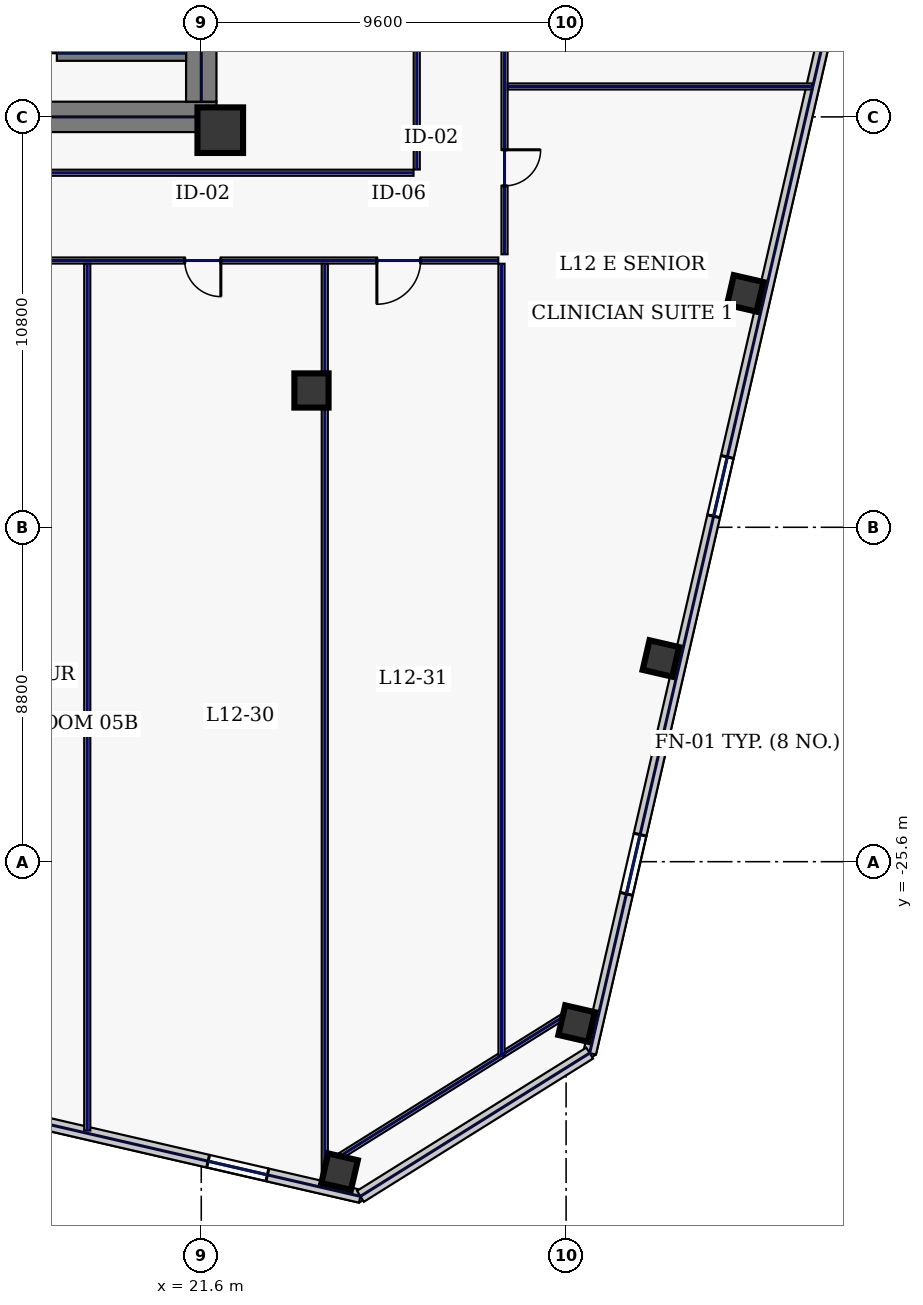
"""IFC4 building model, lengths in metres.
Left out: names, types, materials, properties, quantities, classifications, styles, units other than length and angle.
Written with IfcOpenShell. Run it as: python <this file> out.ifc"""

import sys

from ifc_helpers import new_model, si_unit, direction, frame, frame_2d, origin, origin_2d, place, context, subcontext, project, spatial, rectangle, hollow_rectangle, extrude, element, fill, save


model = new_model("IFC4")
c1 = context("Model", 3, precision=1e-05, world=origin(), true_north=direction((0.0, 1.0)))
c2 = subcontext(c1, "Body", "Model", "MODEL_VIEW")
j1 = project(units=[si_unit("LENGTHUNIT", "METRE"), si_unit("PLANEANGLEUNIT", "RADIAN")], contexts=[c1])
p1 = place(None, origin())
s1 = spatial("IfcSite", under=j1, at=p1, CompositionType="ELEMENT")
p2 = place(p1, origin())
s2 = spatial("IfcBuilding", under=s1, at=p2, CompositionType="ELEMENT")
p3 = place(p2, frame((0.0, 0.0, 59.4)))
s3 = spatial("IfcBuildingStorey", under=s2, at=p3, CompositionType="ELEMENT", Elevation=59.4)
p4 = place(p3, frame((10.4, -6.0, 0.0), z_axis=(0.0, 0.0, 1.0), x_axis=(1.0, 0.0, 0.0)))
e1 = element("IfcWall", 1, at=p4, inside=s3, PredefinedType="SHEAR", context=c2, shape_type="SweptSolid", body=[
    extrude(rectangle(XDim=11.6, YDim=0.8, at=frame_2d((5.8, 0.0))), origin(), (0.0, 0.0, 1.0), 3.74),
])
p5 = place(p3, frame((21.6, -5.6, 0.0), z_axis=(0.0, 0.0, 1.0), x_axis=(0.0, 1.0, 0.0)))
e2 = element("IfcWall", 2, at=p5, inside=s3, PredefinedType="SHEAR", context=c2, shape_type="SweptSolid", body=[
    extrude(rectangle(XDim=11.2, YDim=0.8, at=frame_2d((5.6, 0.0))), origin(), (0.0, 0.0, 1.0), 3.74),
])
p6 = place(p3, frame((17.6, -4.325, 0.0), z_axis=(0.0, 0.0, 1.0), x_axis=(0.0, 1.0, 0.0)))
e3 = element("IfcWall", 3, at=p6, inside=s3, PredefinedType="SHEAR", context=c2, shape_type="SweptSolid", body=[
    extrude(rectangle(XDim=8.65, YDim=0.4, at=frame_2d((4.325, 0.0))), origin(), (0.0, 0.0, 1.0), 3.74),
])
p7 = place(p6, frame((0.25, 0.0, 0.0)))
e4 = element("IfcOpeningElement", 4, at=p7, cuts=e3, PredefinedType="OPENING", context=c2, shape_type="SweptSolid", body=[
    extrude(rectangle(XDim=1.1, YDim=2.2, at=frame_2d((0.55, 1.1))), frame((0.0, 0.21, 0.0), z_axis=(0.0, -1.0, 0.0), x_axis=(1.0, 0.0, 0.0)), (0.0, 0.0, 1.0), 0.42),
])
p8 = place(p3, frame((17.8, -4.325, 0.0), z_axis=(0.0, 0.0, 1.0), x_axis=(1.0, 0.0, 0.0)))
e5 = element("IfcWall", 5, at=p8, inside=s3, PredefinedType="SHEAR", context=c2, shape_type="SweptSolid", body=[
    extrude(rectangle(XDim=3.4, YDim=0.4, at=frame_2d((1.7, 0.0))), origin(), (0.0, 0.0, 1.0), 3.74),
])
p9 = place(p3, frame((22.1, -6.35, 0.0), z_axis=(0.0, 0.0, 1.0), x_axis=(1.0, 0.0, 0.0)))
e6 = element("IfcColumn", 6, at=p9, inside=s3, PredefinedType="COLUMN", context=c2, shape_type="SweptSolid", body=[
    extrude(hollow_rectangle(XDim=1.2, YDim=1.2, WallThickness=0.05, at=origin_2d()), origin(), (0.0, 0.0, 1.0), 3.74),
])
p10 = place(p3, frame((24.5, -13.2, 0.0), z_axis=(0.0, 0.0, 1.0), x_axis=(1.0, 0.0, 0.0)))
e7 = element("IfcColumn", 7, at=p10, inside=s3, PredefinedType="COLUMN", context=c2, shape_type="SweptSolid", body=[
    extrude(hollow_rectangle(XDim=0.9, YDim=0.9, WallThickness=0.04, at=origin_2d()), origin(), (0.0, 0.0, 1.0), 3.74),
])
for number, where, z_axis, x_axis in (
    (8, (25.24, -33.757, 0.0), (0.0, 0.0, 1.0), (0.974, -0.225, 0.0)),
    (9, (31.476, -29.86, 0.0), (0.0, 0.0, 1.0), (0.974, -0.225, 0.0)),
    (10, (33.694, -20.252, 0.0), (0.0, 0.0, 1.0), (0.974, -0.225, 0.0)),
    (11, (35.912, -10.645, 0.0), (0.0, 0.0, 1.0), (0.974, -0.225, 0.0)),
):
    element("IfcColumn", number, at=place(p3, frame(where, z_axis=z_axis, x_axis=x_axis)), inside=s3, PredefinedType="COLUMN", context=c2, shape_type="SweptSolid", body=[
        extrude(hollow_rectangle(XDim=0.8, YDim=0.8, WallThickness=0.036, at=origin_2d()), origin(), (0.0, 0.0, 1.0), 3.74),
    ])
p11 = place(p3, frame((3.717, -29.311, 0.0), z_axis=(0.0, 0.0, 1.0), x_axis=(0.97436993772, -0.224951604723, 0.0)))
e12 = element("IfcWall", 12, at=p11, inside=s3, PredefinedType="STANDARD", context=c2, shape_type="SweptSolid", body=[
    extrude(rectangle(XDim=22.651, YDim=0.34, at=frame_2d((11.326, 0.0))), origin(), (0.0, 0.0, 1.0), 3.74),
])
p12 = place(p11, frame((4.306, 0.0, 0.22)))
e13 = element("IfcOpeningElement", 13, at=p12, cuts=e12, PredefinedType="OPENING", context=c2, shape_type="SweptSolid", body=[
    extrude(rectangle(XDim=1.6, YDim=1.2, at=frame_2d((0.8, 0.6))), frame((0.0, 0.18, 0.0), z_axis=(0.0, -1.0, 0.0), x_axis=(1.0, 0.0, 0.0)), (0.0, 0.0, 1.0), 0.36),
])
p13 = place(p11, frame((18.539, 0.0, 0.22)))
e14 = element("IfcOpeningElement", 14, at=p13, cuts=e12, PredefinedType="OPENING", context=c2, shape_type="SweptSolid", body=[
    extrude(rectangle(XDim=1.6, YDim=1.2, at=frame_2d((0.8, 0.6))), frame((0.0, 0.18, 0.0), z_axis=(0.0, -1.0, 0.0), x_axis=(1.0, 0.0, 0.0)), (0.0, 0.0, 1.0), 0.36),
])
p14 = place(p3, frame((31.82, -30.637, 0.0), z_axis=(0.0, 0.0, 1.0), x_axis=(0.224949969076, 0.974370315338, 0.0)))
e15 = element("IfcWall", 15, at=p14, inside=s3, PredefinedType="STANDARD", context=c2, shape_type="SweptSolid", body=[
    extrude(rectangle(XDim=40.8, YDim=0.34, at=frame_2d((20.4, 0.0))), origin(), (0.0, 0.0, 1.0), 3.74),
])
p15 = place(p14, frame((4.3, 0.0, 0.22)))
e16 = element("IfcOpeningElement", 16, at=p15, cuts=e15, PredefinedType="OPENING", context=c2, shape_type="SweptSolid", body=[
    extrude(rectangle(XDim=1.6, YDim=1.2, at=frame_2d((0.8, 0.6))), frame((0.0, 0.18, 0.0), z_axis=(0.0, -1.0, 0.0), x_axis=(1.0, 0.0, 0.0)), (0.0, 0.0, 1.0), 0.36),
])
p16 = place(p14, frame((14.5, 0.0, 0.22)))
e17 = element("IfcOpeningElement", 17, at=p16, cuts=e15, PredefinedType="OPENING", context=c2, shape_type="SweptSolid", body=[
    extrude(rectangle(XDim=1.6, YDim=1.2, at=frame_2d((0.8, 0.6))), frame((0.0, 0.18, 0.0), z_axis=(0.0, -1.0, 0.0), x_axis=(1.0, 0.0, 0.0)), (0.0, 0.0, 1.0), 0.36),
])
p17 = place(p3, frame((25.788, -34.406, 0.0), z_axis=(0.0, 0.0, 1.0), x_axis=(0.848046504656, 0.529921811158, 0.0)))
e18 = element("IfcWall", 18, at=p17, inside=s3, PredefinedType="STANDARD", context=c2, shape_type="SweptSolid", body=[
    extrude(rectangle(XDim=7.113, YDim=0.34, at=frame_2d((3.557, 0.0))), origin(), (0.0, 0.0, 1.0), 3.74),
])
p18 = place(p3, frame((25.06, -33.468, 0.0), z_axis=(0.0, 0.0, 1.0), x_axis=(0.848043064089, 0.529927317139, 0.0)))
e19 = element("IfcWall", 19, at=p18, inside=s3, PredefinedType="PARTITIONING", context=c2, shape_type="SweptSolid", body=[
    extrude(rectangle(XDim=7.354, YDim=0.16, at=frame_2d((3.677, 0.0))), origin(), (0.0, 0.0, 1.0), 1.535),
])
p19 = place(p3, frame((29.58, 9.665, 0.0), z_axis=(0.0, 0.0, 1.0), x_axis=(0.0, -1.0, 0.0)))
e20 = element("IfcWall", 20, at=p19, inside=s3, PredefinedType="PARTITIONING", context=c2, shape_type="SweptSolid", body=[
    extrude(rectangle(XDim=19.28, YDim=0.16, at=frame_2d((9.64, 0.0))), origin(), (0.0, 0.0, 1.0), 3.74),
])
p20 = place(p19, frame((16.531, 0.0, 0.0)))
e21 = element("IfcOpeningElement", 21, at=p20, cuts=e20, PredefinedType="OPENING", context=c2, shape_type="SweptSolid", body=[
    extrude(rectangle(XDim=0.95, YDim=2.2, at=frame_2d((0.475, 1.1))), frame((0.0, 0.09, 0.0), z_axis=(0.0, -1.0, 0.0), x_axis=(1.0, 0.0, 0.0)), (0.0, 0.0, 1.0), 0.18),
])
p21 = place(p19, frame((11.875, 0.0, 0.0)))
e22 = element("IfcOpeningElement", 22, at=p21, cuts=e20, PredefinedType="OPENING", context=c2, shape_type="SweptSolid", body=[
    extrude(rectangle(XDim=0.95, YDim=2.2, at=frame_2d((0.475, 1.1))), frame((0.0, 0.09, 0.0), z_axis=(0.0, -1.0, 0.0), x_axis=(1.0, 0.0, 0.0)), (0.0, 0.0, 1.0), 0.18),
])
p22 = place(p19, frame((6.675, 0.0, 0.0)))
e23 = element("IfcOpeningElement", 23, at=p22, cuts=e20, PredefinedType="OPENING", context=c2, shape_type="SweptSolid", body=[
    extrude(rectangle(XDim=0.95, YDim=2.2, at=frame_2d((0.475, 1.1))), frame((0.0, 0.09, 0.0), z_axis=(0.0, -1.0, 0.0), x_axis=(1.0, 0.0, 0.0)), (0.0, 0.0, 1.0), 0.18),
])
p23 = place(p19, frame((1.994, 0.0, 0.0)))
e24 = element("IfcOpeningElement", 24, at=p23, cuts=e20, PredefinedType="OPENING", context=c2, shape_type="SweptSolid", body=[
    extrude(rectangle(XDim=0.95, YDim=2.2, at=frame_2d((0.475, 1.1))), frame((0.0, 0.09, 0.0), z_axis=(0.0, -1.0, 0.0), x_axis=(1.0, 0.0, 0.0)), (0.0, 0.0, 1.0), 0.18),
])
p24 = place(p3, frame((29.415, -9.78, 0.0), z_axis=(0.0, 0.0, 1.0), x_axis=(-1.0, 0.0, 0.0)))
e25 = element("IfcWall", 25, at=p24, inside=s3, PredefinedType="PARTITIONING", context=c2, shape_type="SweptSolid", body=[
    extrude(rectangle(XDim=58.83, YDim=0.16, at=frame_2d((29.415, 0.0))), origin(), (0.0, 0.0, 1.0), 3.74),
])
p25 = place(p24, frame((56.006, 0.0, 0.0)))
e26 = element("IfcOpeningElement", 26, at=p25, cuts=e25, PredefinedType="OPENING", context=c2, shape_type="SweptSolid", body=[
    extrude(rectangle(XDim=0.95, YDim=2.2, at=frame_2d((0.475, 1.1))), frame((0.0, 0.09, 0.0), z_axis=(0.0, -1.0, 0.0), x_axis=(1.0, 0.0, 0.0)), (0.0, 0.0, 1.0), 0.18),
])
p26 = place(p24, frame((50.39, 0.0, 0.0)))
e27 = element("IfcOpeningElement", 27, at=p26, cuts=e25, PredefinedType="OPENING", context=c2, shape_type="SweptSolid", body=[
    extrude(rectangle(XDim=0.95, YDim=2.2, at=frame_2d((0.475, 1.1))), frame((0.0, 0.09, 0.0), z_axis=(0.0, -1.0, 0.0), x_axis=(1.0, 0.0, 0.0)), (0.0, 0.0, 1.0), 0.18),
])
p27 = place(p24, frame((43.87, 0.0, 0.0)))
e28 = element("IfcOpeningElement", 28, at=p27, cuts=e25, PredefinedType="OPENING", context=c2, shape_type="SweptSolid", body=[
    extrude(rectangle(XDim=1.05, YDim=2.2, at=frame_2d((0.525, 1.1))), frame((0.0, 0.09, 0.0), z_axis=(0.0, -1.0, 0.0), x_axis=(1.0, 0.0, 0.0)), (0.0, 0.0, 1.0), 0.18),
])
p28 = place(p24, frame((37.135, 0.0, 0.0)))
e29 = element("IfcOpeningElement", 29, at=p28, cuts=e25, PredefinedType="OPENING", context=c2, shape_type="SweptSolid", body=[
    extrude(rectangle(XDim=0.95, YDim=2.2, at=frame_2d((0.475, 1.1))), frame((0.0, 0.09, 0.0), z_axis=(0.0, -1.0, 0.0), x_axis=(1.0, 0.0, 0.0)), (0.0, 0.0, 1.0), 0.18),
])
p29 = place(p24, frame((30.907, 0.0, 0.0)))
e30 = element("IfcOpeningElement", 30, at=p29, cuts=e25, PredefinedType="OPENING", context=c2, shape_type="SweptSolid", body=[
    extrude(rectangle(XDim=0.95, YDim=2.2, at=frame_2d((0.475, 1.1))), frame((0.0, 0.09, 0.0), z_axis=(0.0, -1.0, 0.0), x_axis=(1.0, 0.0, 0.0)), (0.0, 0.0, 1.0), 0.18),
])
p30 = place(p24, frame((26.302, 0.0, 0.0)))
e31 = element("IfcOpeningElement", 31, at=p30, cuts=e25, PredefinedType="OPENING", context=c2, shape_type="SweptSolid", body=[
    extrude(rectangle(XDim=0.95, YDim=2.2, at=frame_2d((0.475, 1.1))), frame((0.0, 0.09, 0.0), z_axis=(0.0, -1.0, 0.0), x_axis=(1.0, 0.0, 0.0)), (0.0, 0.0, 1.0), 0.18),
])
p31 = place(p24, frame((20.55, 0.0, 0.0)))
e32 = element("IfcOpeningElement", 32, at=p31, cuts=e25, PredefinedType="OPENING", context=c2, shape_type="SweptSolid", body=[
    extrude(rectangle(XDim=0.95, YDim=2.2, at=frame_2d((0.475, 1.1))), frame((0.0, 0.09, 0.0), z_axis=(0.0, -1.0, 0.0), x_axis=(1.0, 0.0, 0.0)), (0.0, 0.0, 1.0), 0.18),
])
p32 = place(p24, frame((13.65, 0.0, 0.0)))
e33 = element("IfcOpeningElement", 33, at=p32, cuts=e25, PredefinedType="OPENING", context=c2, shape_type="SweptSolid", body=[
    extrude(rectangle(XDim=1.05, YDim=2.2, at=frame_2d((0.525, 1.1))), frame((0.0, 0.09, 0.0), z_axis=(0.0, -1.0, 0.0), x_axis=(1.0, 0.0, 0.0)), (0.0, 0.0, 1.0), 0.18),
])
p33 = place(p24, frame((7.3, 0.0, 0.0)))
e34 = element("IfcOpeningElement", 34, at=p33, cuts=e25, PredefinedType="OPENING", context=c2, shape_type="SweptSolid", body=[
    extrude(rectangle(XDim=0.95, YDim=2.2, at=frame_2d((0.475, 1.1))), frame((0.0, 0.09, 0.0), z_axis=(0.0, -1.0, 0.0), x_axis=(1.0, 0.0, 0.0)), (0.0, 0.0, 1.0), 0.18),
])
p34 = place(p24, frame((2.044, 0.0, 0.0)))
e35 = element("IfcOpeningElement", 35, at=p34, cuts=e25, PredefinedType="OPENING", context=c2, shape_type="SweptSolid", body=[
    extrude(rectangle(XDim=1.15, YDim=2.2, at=frame_2d((0.575, 1.1))), frame((0.0, 0.09, 0.0), z_axis=(0.0, -1.0, 0.0), x_axis=(1.0, 0.0, 0.0)), (0.0, 0.0, 1.0), 0.18),
])
p35 = place(p3, frame((10.665, -7.47, 0.0), z_axis=(0.0, 0.0, 1.0), x_axis=(1.0, 0.0, 0.0)))
e36 = element("IfcWall", 36, at=p35, inside=s3, PredefinedType="PARTITIONING", context=c2, shape_type="SweptSolid", body=[
    extrude(rectangle(XDim=16.52, YDim=0.16, at=frame_2d((8.26, 0.0))), origin(), (0.0, 0.0, 1.0), 3.74),
])
p36 = place(p3, frame((27.27, -7.385, 0.0), z_axis=(0.0, 0.0, 1.0), x_axis=(0.0, 1.0, 0.0)))
e37 = element("IfcWall", 37, at=p36, inside=s3, PredefinedType="PARTITIONING", context=c2, shape_type="SweptSolid", body=[
    extrude(rectangle(XDim=14.82, YDim=0.16, at=frame_2d((7.41, 0.0))), origin(), (0.0, 0.0, 1.0), 3.74),
])
p37 = place(p3, frame((29.5, -30.703, 0.0), z_axis=(0.0, 0.0, 1.0), x_axis=(0.0, 1.0, 0.0)))
e38 = element("IfcWall", 38, at=p37, inside=s3, PredefinedType="PARTITIONING", context=c2, shape_type="SweptSolid", body=[
    extrude(rectangle(XDim=20.838, YDim=0.16, at=frame_2d((10.419, 0.0))), origin(), (0.0, 0.0, 1.0), 3.74),
])
p38 = place(p3, frame((18.6, -32.675, 0.0), z_axis=(0.0, 0.0, 1.0), x_axis=(0.0, 1.0, 0.0)))
e39 = element("IfcWall", 39, at=p38, inside=s3, PredefinedType="PARTITIONING", context=c2, shape_type="SweptSolid", body=[
    extrude(rectangle(XDim=22.81, YDim=0.16, at=frame_2d((11.405, 0.0))), origin(), (0.0, 0.0, 1.0), 3.74),
])
p39 = place(p3, frame((24.85, -34.118, 0.0), z_axis=(0.0, 0.0, 1.0), x_axis=(0.0, 1.0, 0.0)))
e40 = element("IfcWall", 40, at=p39, inside=s3, PredefinedType="PARTITIONING", context=c2, shape_type="SweptSolid", body=[
    extrude(rectangle(XDim=24.253, YDim=0.16, at=frame_2d((12.126, 0.0))), origin(), (0.0, 0.0, 1.0), 3.235),
])
p40 = place(p3, frame((29.665, -5.2, 0.0), z_axis=(0.0, 0.0, 1.0), x_axis=(1.0, 0.0, 0.0)))
e41 = element("IfcWall", 41, at=p40, inside=s3, PredefinedType="PARTITIONING", context=c2, shape_type="SweptSolid", body=[
    extrude(rectangle(XDim=8.007, YDim=0.16, at=frame_2d((4.003, 0.0))), origin(), (0.0, 0.0, 1.0), 3.74),
])
p41 = place(p13, origin())
e42 = element("IfcWindow", 42, at=p41, inside=s3, PartitioningType="SINGLE_PANEL", PredefinedType="WINDOW", context=c2, shape_type="SweptSolid", body=[
    extrude(rectangle(XDim=1.6, YDim=1.2, at=frame_2d((0.8, 0.6))), frame((0.0, 0.03, 0.0), z_axis=(0.0, -1.0, 0.0), x_axis=(1.0, 0.0, 0.0)), (0.0, 0.0, 1.0), 0.06),
])
fill(e14, e42)
p42 = place(p15, origin())
e43 = element("IfcWindow", 43, at=p42, inside=s3, PartitioningType="SINGLE_PANEL", PredefinedType="WINDOW", context=c2, shape_type="SweptSolid", body=[
    extrude(rectangle(XDim=1.6, YDim=1.2, at=frame_2d((0.8, 0.6))), frame((0.0, 0.03, 0.0), z_axis=(0.0, -1.0, 0.0), x_axis=(1.0, 0.0, 0.0)), (0.0, 0.0, 1.0), 0.06),
])
fill(e16, e43)
p43 = place(p16, origin())
e44 = element("IfcWindow", 44, at=p43, inside=s3, PartitioningType="SINGLE_PANEL", PredefinedType="WINDOW", context=c2, shape_type="SweptSolid", body=[
    extrude(rectangle(XDim=1.6, YDim=1.2, at=frame_2d((0.8, 0.6))), frame((0.0, 0.03, 0.0), z_axis=(0.0, -1.0, 0.0), x_axis=(1.0, 0.0, 0.0)), (0.0, 0.0, 1.0), 0.06),
])
fill(e17, e44)
p44 = place(p33, origin())
e45 = element("IfcDoor", 45, at=p44, inside=s3, OperationType="SINGLE_SWING_LEFT", PredefinedType="DOOR", context=c2, shape_type="SweptSolid", body=[
    extrude(rectangle(XDim=0.95, YDim=2.2, at=frame_2d((0.475, 1.1))), frame((0.0, 0.025, 0.0), z_axis=(0.0, -1.0, 0.0), x_axis=(1.0, 0.0, 0.0)), (0.0, 0.0, 1.0), 0.05),
])
fill(e34, e45)
p45 = place(p34, origin())
e46 = element("IfcDoor", 46, at=p45, inside=s3, OperationType="SINGLE_SWING_RIGHT", PredefinedType="DOOR", context=c2, shape_type="SweptSolid", body=[
    extrude(rectangle(XDim=1.15, YDim=2.2, at=frame_2d((0.575, 1.1))), frame((0.0, 0.025, 0.0), z_axis=(0.0, -1.0, 0.0), x_axis=(1.0, 0.0, 0.0)), (0.0, 0.0, 1.0), 0.05),
])
fill(e35, e46)
p46 = place(p20, origin())
e47 = element("IfcDoor", 47, at=p46, inside=s3, OperationType="SINGLE_SWING_LEFT", PredefinedType="DOOR", context=c2, shape_type="SweptSolid", body=[
    extrude(rectangle(XDim=0.95, YDim=2.2, at=frame_2d((0.475, 1.1))), frame((0.0, 0.025, 0.0), z_axis=(0.0, -1.0, 0.0), x_axis=(1.0, 0.0, 0.0)), (0.0, 0.0, 1.0), 0.05),
])
fill(e21, e47)
save(model, sys.argv[1])
